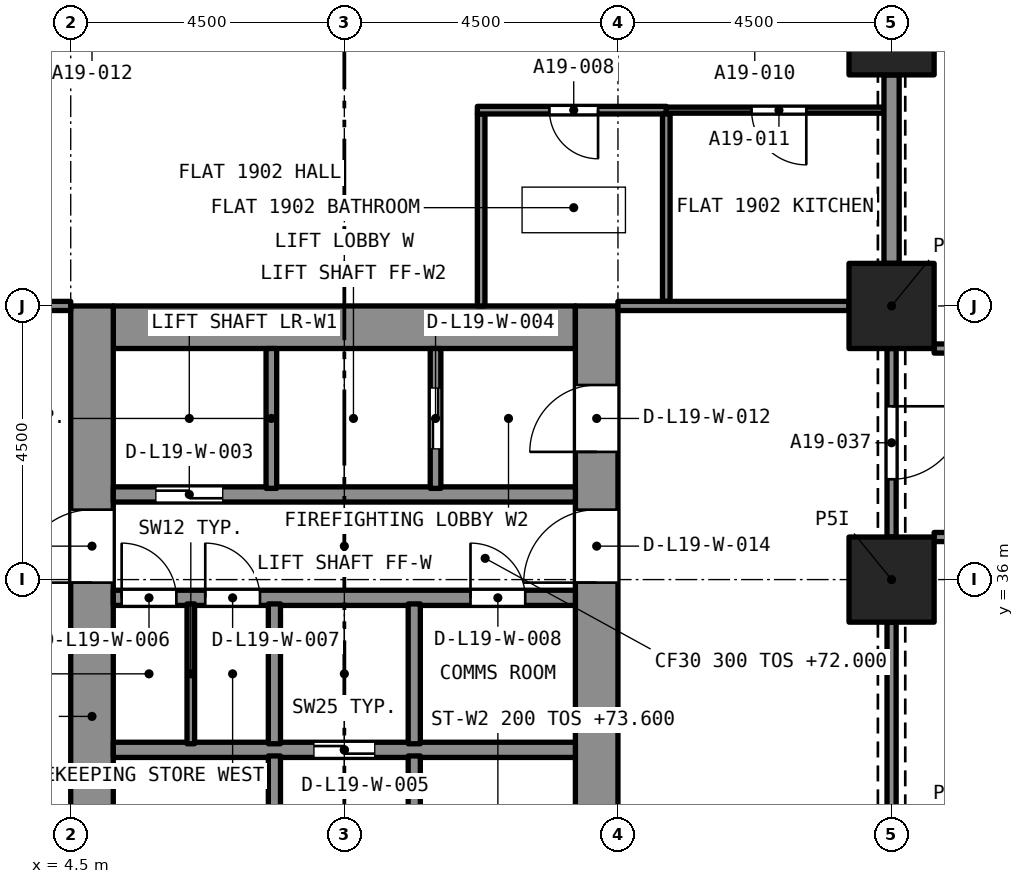
"""IFC4 building model, lengths in metres.
Left out: names, types, materials, properties, quantities, classifications, styles, units other than length and angle.
Written with IfcOpenShell. Run it as: python <this file> out.ifc"""

import sys

from ifc_helpers import new_model, si_unit, direction, frame, frame_2d, origin, origin_2d, place, context, subcontext, project, spatial, rectangle, extrude, element, fill, save


model = new_model("IFC4")
c1 = context("Model", 3, precision=1e-05, world=origin(), true_north=direction((0.0, 1.0)))
c2 = subcontext(c1, "Body", "Model", "MODEL_VIEW")
j1 = project(units=[si_unit("LENGTHUNIT", "METRE"), si_unit("PLANEANGLEUNIT", "RADIAN")], contexts=[c1])
p1 = place(None, origin())
s1 = spatial("IfcSite", under=j1, at=p1, CompositionType="ELEMENT")
p2 = place(p1, origin())
s2 = spatial("IfcBuilding", under=s1, at=p2, CompositionType="ELEMENT")
p3 = place(p2, frame((0.0, 0.0, 72.0)))
s3 = spatial("IfcBuildingStorey", under=s2, at=p3, CompositionType="ELEMENT", Elevation=72.0)
for number, where, z_axis, x_axis in (
    (1, (18.0, 36.0, 0.0), (0.0, 0.0, 1.0), (1.0, 0.0, 0.0)),
    (2, (18.0, 40.5, 0.0), (0.0, 0.0, 1.0), (1.0, 0.0, 0.0)),
    (3, (18.0, 45.0, 0.0), (0.0, 0.0, 1.0), (1.0, 0.0, 0.0)),
):
    element("IfcColumn", number, at=place(p3, frame(where, z_axis=z_axis, x_axis=x_axis)), inside=s3, PredefinedType="COLUMN", context=c2, shape_type="SweptSolid", body=[
        extrude(rectangle(XDim=1.4, YDim=1.4, at=origin_2d()), origin(), (0.0, 0.0, 1.0), 3.2),
    ])
p4 = place(p3, frame((5.2, 40.15, 0.0), z_axis=(0.0, 0.0, 1.0), x_axis=(1.0, 0.0, 0.0)))
e4 = element("IfcWall", 4, at=p4, inside=s3, PredefinedType="SOLIDWALL", context=c2, shape_type="SweptSolid", body=[
    extrude(rectangle(XDim=7.6, YDim=0.7, at=frame_2d((3.8, 0.0))), origin(), (0.0, 0.0, 1.0), 3.2),
])
p5 = place(p3, frame((4.85, 27.0, 0.0), z_axis=(0.0, 0.0, 1.0), x_axis=(0.0, 1.0, 0.0)))
e5 = element("IfcWall", 5, at=p5, inside=s3, PredefinedType="SOLIDWALL", context=c2, shape_type="SweptSolid", body=[
    extrude(rectangle(XDim=13.5, YDim=0.7, at=frame_2d((6.75, 0.0))), origin(), (0.0, 0.0, 1.0), 3.2),
])
p6 = place(p5, frame((8.95, 0.0, 0.0)))
e6 = element("IfcOpeningElement", 6, at=p6, cuts=e5, PredefinedType="OPENING", context=c2, shape_type="SweptSolid", body=[
    extrude(rectangle(XDim=1.2, YDim=2.1, at=frame_2d((0.6, 1.05))), frame((0.0, 0.36, 0.0), z_axis=(0.0, -1.0, 0.0), x_axis=(1.0, 0.0, 0.0)), (0.0, 0.0, 1.0), 0.72),
])
p7 = place(p3, frame((13.15, 27.0, 0.0), z_axis=(0.0, 0.0, 1.0), x_axis=(0.0, 1.0, 0.0)))
e7 = element("IfcWall", 7, at=p7, inside=s3, PredefinedType="SOLIDWALL", context=c2, shape_type="SweptSolid", body=[
    extrude(rectangle(XDim=13.5, YDim=0.7, at=frame_2d((6.75, 0.0))), origin(), (0.0, 0.0, 1.0), 3.2),
])
p8 = place(p7, frame((11.1, 0.0, 0.0)))
e8 = element("IfcOpeningElement", 8, at=p8, cuts=e7, PredefinedType="OPENING", context=c2, shape_type="SweptSolid", body=[
    extrude(rectangle(XDim=1.1, YDim=2.1, at=frame_2d((0.55, 1.05))), frame((0.0, 0.36, 0.0), z_axis=(0.0, -1.0, 0.0), x_axis=(1.0, 0.0, 0.0)), (0.0, 0.0, 1.0), 0.72),
])
p9 = place(p7, frame((8.95, 0.0, 0.0)))
e9 = element("IfcOpeningElement", 9, at=p9, cuts=e7, PredefinedType="OPENING", context=c2, shape_type="SweptSolid", body=[
    extrude(rectangle(XDim=1.2, YDim=2.1, at=frame_2d((0.6, 1.05))), frame((0.0, 0.36, 0.0), z_axis=(0.0, -1.0, 0.0), x_axis=(1.0, 0.0, 0.0)), (0.0, 0.0, 1.0), 0.72),
])
p10 = place(p3, frame((11.25, 40.5, 0.0), z_axis=(0.0, 0.0, 1.0), x_axis=(0.0, 1.0, 0.0)))
e10 = element("IfcWall", 10, at=p10, inside=s3, PredefinedType="PARTITIONING", context=c2, shape_type="SweptSolid", body=[
    extrude(rectangle(XDim=3.157, YDim=0.125, at=frame_2d((1.579, 0.0))), origin(), (0.0, 0.0, 1.0), 2.7),
])
p11 = place(p3, frame((14.295, 43.72, 0.0), z_axis=(0.0, 0.0, 1.0), x_axis=(-1.0, 0.0, 0.0)))
e11 = element("IfcWall", 11, at=p11, inside=s3, PredefinedType="PARTITIONING", context=c2, shape_type="SweptSolid", body=[
    extrude(rectangle(XDim=3.108, YDim=0.125, at=frame_2d((1.554, 0.0))), origin(), (0.0, 0.0, 1.0), 2.7),
])
p12 = place(p11, frame((1.123, 0.0, 0.0)))
e12 = element("IfcOpeningElement", 12, at=p12, cuts=e11, PredefinedType="OPENING", context=c2, shape_type="SweptSolid", body=[
    extrude(rectangle(XDim=0.8, YDim=2.1, at=frame_2d((0.4, 1.05))), frame((0.0, 0.073, 0.0), z_axis=(0.0, -1.0, 0.0), x_axis=(1.0, 0.0, 0.0)), (0.0, 0.0, 1.0), 0.145),
])
p13 = place(p3, frame((14.295, 40.575, 0.0), z_axis=(0.0, 0.0, 1.0), x_axis=(0.0, 1.0, 0.0)))
e13 = element("IfcWall", 13, at=p13, inside=s3, PredefinedType="PARTITIONING", context=c2, shape_type="SweptSolid", body=[
    extrude(rectangle(XDim=3.083, YDim=0.125, at=frame_2d((1.541, 0.0))), origin(), (0.0, 0.0, 1.0), 2.7),
])
p14 = place(p3, frame((13.5, 40.5, 0.0), z_axis=(0.0, 0.0, 1.0), x_axis=(1.0, 0.0, 0.0)))
e14 = element("IfcWall", 14, at=p14, inside=s3, PredefinedType="PARTITIONING", context=c2, shape_type="SweptSolid", body=[
    extrude(rectangle(XDim=3.8, YDim=0.15, at=frame_2d((1.9, 0.0))), origin(), (0.0, 0.0, 1.0), 2.7),
])
p15 = place(p3, frame((17.875, 43.72, 0.0), z_axis=(0.0, 0.0, 1.0), x_axis=(-1.0, 0.0, 0.0)))
e15 = element("IfcWall", 15, at=p15, inside=s3, PredefinedType="PARTITIONING", context=c2, shape_type="SweptSolid", body=[
    extrude(rectangle(XDim=3.58, YDim=0.1, at=frame_2d((1.79, 0.0))), origin(), (0.0, 0.0, 1.0), 2.7),
])
p16 = place(p15, frame((1.277, 0.0, 0.0)))
e16 = element("IfcOpeningElement", 16, at=p16, cuts=e15, PredefinedType="OPENING", context=c2, shape_type="SweptSolid", body=[
    extrude(rectangle(XDim=0.9, YDim=2.1, at=frame_2d((0.45, 1.05))), frame((0.0, 0.06, 0.0), z_axis=(0.0, -1.0, 0.0), x_axis=(1.0, 0.0, 0.0)), (0.0, 0.0, 1.0), 0.12),
])
p17 = place(p3, frame((0.7, 40.5, 0.0), z_axis=(0.0, 0.0, 1.0), x_axis=(1.0, 0.0, 0.0)))
e17 = element("IfcWall", 17, at=p17, inside=s3, PredefinedType="PARTITIONING", context=c2, shape_type="SweptSolid", body=[
    extrude(rectangle(XDim=3.8, YDim=0.15, at=frame_2d((1.9, 0.0))), origin(), (0.0, 0.0, 1.0), 2.7),
])
p18 = place(p17, frame((1.05, 0.0, 0.0)))
e18 = element("IfcOpeningElement", 18, at=p18, cuts=e17, PredefinedType="OPENING", context=c2, shape_type="SweptSolid", body=[
    extrude(rectangle(XDim=1.0, YDim=2.1, at=frame_2d((0.5, 1.05))), frame((0.0, 0.085, 0.0), z_axis=(0.0, -1.0, 0.0), x_axis=(1.0, 0.0, 0.0)), (0.0, 0.0, 1.0), 0.17),
])
p19 = place(p3, frame((18.0, 41.2, 0.0), z_axis=(0.0, 0.0, 1.0), x_axis=(0.0, 1.0, 0.0)))
e19 = element("IfcWall", 19, at=p19, inside=s3, PredefinedType="PARTITIONING", context=c2, shape_type="SweptSolid", body=[
    extrude(rectangle(XDim=3.1, YDim=0.25, at=frame_2d((1.55, 0.0))), origin(), (0.0, 0.0, 1.0), 2.38),
])
p20 = place(p3, frame((18.7, 39.8, 0.0), z_axis=(0.0, 0.0, 1.0), x_axis=(1.0, 0.0, 0.0)))
e20 = element("IfcWall", 20, at=p20, inside=s3, PredefinedType="PARTITIONING", context=c2, shape_type="SweptSolid", body=[
    extrude(rectangle(XDim=12.1, YDim=0.15, at=frame_2d((6.05, 0.0))), origin(), (0.0, 0.0, 1.0), 2.7),
])
p21 = place(p20, frame((5.55, 0.0, 0.0)))
e21 = element("IfcOpeningElement", 21, at=p21, cuts=e20, PredefinedType="OPENING", context=c2, shape_type="SweptSolid", body=[
    extrude(rectangle(XDim=1.0, YDim=2.1, at=frame_2d((0.5, 1.05))), frame((0.0, 0.085, 0.0), z_axis=(0.0, -1.0, 0.0), x_axis=(1.0, 0.0, 0.0)), (0.0, 0.0, 1.0), 0.17),
])
p22 = place(p3, frame((30.8, 36.7, 0.0), z_axis=(0.0, 0.0, 1.0), x_axis=(-1.0, 0.0, 0.0)))
e22 = element("IfcWall", 22, at=p22, inside=s3, PredefinedType="PARTITIONING", context=c2, shape_type="SweptSolid", body=[
    extrude(rectangle(XDim=12.1, YDim=0.15, at=frame_2d((6.05, 0.0))), origin(), (0.0, 0.0, 1.0), 2.7),
])
p23 = place(p22, frame((5.55, 0.0, 0.0)))
e23 = element("IfcOpeningElement", 23, at=p23, cuts=e22, PredefinedType="OPENING", context=c2, shape_type="SweptSolid", body=[
    extrude(rectangle(XDim=1.0, YDim=2.1, at=frame_2d((0.5, 1.05))), frame((0.0, 0.085, 0.0), z_axis=(0.0, -1.0, 0.0), x_axis=(1.0, 0.0, 0.0)), (0.0, 0.0, 1.0), 0.17),
])
p24 = place(p3, frame((18.0, 39.8, 0.0), z_axis=(0.0, 0.0, 1.0), x_axis=(0.0, -1.0, 0.0)))
e24 = element("IfcWall", 24, at=p24, inside=s3, PredefinedType="PARTITIONING", context=c2, shape_type="SweptSolid", body=[
    extrude(rectangle(XDim=3.1, YDim=0.15, at=frame_2d((1.55, 0.0))), origin(), (0.0, 0.0, 1.0), 2.38),
])
p25 = place(p24, frame((0.95, 0.0, 0.0)))
e25 = element("IfcOpeningElement", 25, at=p25, cuts=e24, PredefinedType="OPENING", context=c2, shape_type="SweptSolid", body=[
    extrude(rectangle(XDim=1.2, YDim=2.1, at=frame_2d((0.6, 1.05))), frame((0.0, 0.085, 0.0), z_axis=(0.0, -1.0, 0.0), x_axis=(1.0, 0.0, 0.0)), (0.0, 0.0, 1.0), 0.17),
])
p26 = place(p3, frame((18.0, 32.2, 0.0), z_axis=(0.0, 0.0, 1.0), x_axis=(0.0, 1.0, 0.0)))
e26 = element("IfcWall", 26, at=p26, inside=s3, PredefinedType="PARTITIONING", context=c2, shape_type="SweptSolid", body=[
    extrude(rectangle(XDim=3.1, YDim=0.15, at=frame_2d((1.55, 0.0))), origin(), (0.0, 0.0, 1.0), 2.38),
])
p27 = place(p3, frame((5.2, 33.2, 0.0), z_axis=(0.0, 0.0, 1.0), x_axis=(1.0, 0.0, 0.0)))
e27 = element("IfcWall", 27, at=p27, inside=s3, PredefinedType="SOLIDWALL", context=c2, shape_type="SweptSolid", body=[
    extrude(rectangle(XDim=7.6, YDim=0.25, at=frame_2d((3.8, 0.0))), origin(), (0.0, 0.0, 1.0), 2.7),
])
p28 = place(p27, frame((3.3, 0.0, 0.0)))
e28 = element("IfcOpeningElement", 28, at=p28, cuts=e27, PredefinedType="OPENING", context=c2, shape_type="SweptSolid", body=[
    extrude(rectangle(XDim=1.0, YDim=2.1, at=frame_2d((0.5, 1.05))), frame((0.0, 0.135, 0.0), z_axis=(0.0, -1.0, 0.0), x_axis=(1.0, 0.0, 0.0)), (0.0, 0.0, 1.0), 0.27),
])
p29 = place(p3, frame((5.2, 35.7, 0.0), z_axis=(0.0, 0.0, 1.0), x_axis=(1.0, 0.0, 0.0)))
e29 = element("IfcWall", 29, at=p29, inside=s3, PredefinedType="SOLIDWALL", context=c2, shape_type="SweptSolid", body=[
    extrude(rectangle(XDim=7.6, YDim=0.25, at=frame_2d((3.8, 0.0))), origin(), (0.0, 0.0, 1.0), 2.7),
])
p30 = place(p29, frame((0.137, 0.0, 0.0)))
e30 = element("IfcOpeningElement", 30, at=p30, cuts=e29, PredefinedType="OPENING", context=c2, shape_type="SweptSolid", body=[
    extrude(rectangle(XDim=0.9, YDim=2.1, at=frame_2d((0.45, 1.05))), frame((0.0, 0.135, 0.0), z_axis=(0.0, -1.0, 0.0), x_axis=(1.0, 0.0, 0.0)), (0.0, 0.0, 1.0), 0.27),
])
p31 = place(p29, frame((1.512, 0.0, 0.0)))
e31 = element("IfcOpeningElement", 31, at=p31, cuts=e29, PredefinedType="OPENING", context=c2, shape_type="SweptSolid", body=[
    extrude(rectangle(XDim=0.9, YDim=2.1, at=frame_2d((0.45, 1.05))), frame((0.0, 0.135, 0.0), z_axis=(0.0, -1.0, 0.0), x_axis=(1.0, 0.0, 0.0)), (0.0, 0.0, 1.0), 0.27),
])
p32 = place(p29, frame((5.875, 0.0, 0.0)))
e32 = element("IfcOpeningElement", 32, at=p32, cuts=e29, PredefinedType="OPENING", context=c2, shape_type="SweptSolid", body=[
    extrude(rectangle(XDim=0.9, YDim=2.1, at=frame_2d((0.45, 1.05))), frame((0.0, 0.135, 0.0), z_axis=(0.0, -1.0, 0.0), x_axis=(1.0, 0.0, 0.0)), (0.0, 0.0, 1.0), 0.27),
])
p33 = place(p3, frame((5.2, 37.4, 0.0), z_axis=(0.0, 0.0, 1.0), x_axis=(1.0, 0.0, 0.0)))
e33 = element("IfcWall", 33, at=p33, inside=s3, PredefinedType="SOLIDWALL", context=c2, shape_type="SweptSolid", body=[
    extrude(rectangle(XDim=7.6, YDim=0.25, at=frame_2d((3.8, 0.0))), origin(), (0.0, 0.0, 1.0), 2.7),
])
p34 = place(p33, frame((0.7, 0.0, 0.0)))
e34 = element("IfcOpeningElement", 34, at=p34, cuts=e33, PredefinedType="OPENING", context=c2, shape_type="SweptSolid", body=[
    extrude(rectangle(XDim=1.1, YDim=2.4, at=frame_2d((0.55, 1.2))), frame((0.0, 0.135, 0.0), z_axis=(0.0, -1.0, 0.0), x_axis=(1.0, 0.0, 0.0)), (0.0, 0.0, 1.0), 0.27),
])
p35 = place(p3, frame((7.85, 27.7, 0.0), z_axis=(0.0, 0.0, 1.0), x_axis=(0.0, 1.0, 0.0)))
e35 = element("IfcWall", 35, at=p35, inside=s3, PredefinedType="SOLIDWALL", context=c2, shape_type="SweptSolid", body=[
    extrude(rectangle(XDim=5.4, YDim=0.2, at=frame_2d((2.7, 0.0))), origin(), (0.0, 0.0, 1.0), 2.7),
])
p36 = place(p35, frame((0.2, 0.0, 0.0)))
e36 = element("IfcOpeningElement", 36, at=p36, cuts=e35, PredefinedType="OPENING", context=c2, shape_type="SweptSolid", body=[
    extrude(rectangle(XDim=0.9, YDim=2.1, at=frame_2d((0.45, 1.05))), frame((0.0, 0.11, 0.0), z_axis=(0.0, -1.0, 0.0), x_axis=(1.0, 0.0, 0.0)), (0.0, 0.0, 1.0), 0.22),
])
p37 = place(p3, frame((10.15, 27.7, 0.0), z_axis=(0.0, 0.0, 1.0), x_axis=(0.0, 1.0, 0.0)))
e37 = element("IfcWall", 37, at=p37, inside=s3, PredefinedType="SOLIDWALL", context=c2, shape_type="SweptSolid", body=[
    extrude(rectangle(XDim=5.4, YDim=0.2, at=frame_2d((2.7, 0.0))), origin(), (0.0, 0.0, 1.0), 2.7),
])
p38 = place(p37, frame((0.2, 0.0, 0.0)))
e38 = element("IfcOpeningElement", 38, at=p38, cuts=e37, PredefinedType="OPENING", context=c2, shape_type="SweptSolid", body=[
    extrude(rectangle(XDim=0.9, YDim=2.1, at=frame_2d((0.45, 1.05))), frame((0.0, 0.11, 0.0), z_axis=(0.0, -1.0, 0.0), x_axis=(1.0, 0.0, 0.0)), (0.0, 0.0, 1.0), 0.22),
])
for number, where, z_axis, x_axis in (
    (39, (7.85, 33.3, 0.0), (0.0, 0.0, 1.0), (0.0, 1.0, 0.0)),
    (40, (10.15, 33.3, 0.0), (0.0, 0.0, 1.0), (0.0, 1.0, 0.0)),
):
    element("IfcWall", number, at=place(p3, frame(where, z_axis=z_axis, x_axis=x_axis)), inside=s3, PredefinedType="SOLIDWALL", context=c2, shape_type="SweptSolid", body=[
        extrude(rectangle(XDim=2.3, YDim=0.2, at=frame_2d((1.15, 0.0))), origin(), (0.0, 0.0, 1.0), 2.7),
    ])
p39 = place(p3, frame((7.8, 37.5, 0.0), z_axis=(0.0, 0.0, 1.0), x_axis=(0.0, 1.0, 0.0)))
e41 = element("IfcWall", 41, at=p39, inside=s3, PredefinedType="SOLIDWALL", context=c2, shape_type="SweptSolid", body=[
    extrude(rectangle(XDim=2.3, YDim=0.175, at=frame_2d((1.15, 0.0))), origin(), (0.0, 0.0, 1.0), 2.7),
])
p40 = place(p3, frame((10.5, 37.5, 0.0), z_axis=(0.0, 0.0, 1.0), x_axis=(0.0, 1.0, 0.0)))
e42 = element("IfcWall", 42, at=p40, inside=s3, PredefinedType="SOLIDWALL", context=c2, shape_type="SweptSolid", body=[
    extrude(rectangle(XDim=2.3, YDim=0.175, at=frame_2d((1.15, 0.0))), origin(), (0.0, 0.0, 1.0), 2.7),
])
p41 = place(p40, frame((0.65, 0.0, 0.0)))
e43 = element("IfcOpeningElement", 43, at=p41, cuts=e42, PredefinedType="OPENING", context=c2, shape_type="SweptSolid", body=[
    extrude(rectangle(XDim=1.0, YDim=2.1, at=frame_2d((0.5, 1.05))), frame((0.0, 0.097, 0.0), z_axis=(0.0, -1.0, 0.0), x_axis=(1.0, 0.0, 0.0)), (0.0, 0.0, 1.0), 0.195),
])
p42 = place(p3, frame((6.475, 33.3, 0.0), z_axis=(0.0, 0.0, 1.0), x_axis=(0.0, 1.0, 0.0)))
e44 = element("IfcWall", 44, at=p42, inside=s3, PredefinedType="PARTITIONING", context=c2, shape_type="SweptSolid", body=[
    extrude(rectangle(XDim=2.3, YDim=0.125, at=frame_2d((1.15, 0.0))), origin(), (0.0, 0.0, 1.0), 2.7),
])
p43 = place(p12, origin())
e45 = element("IfcDoor", 45, at=p43, inside=s3, OperationType="SINGLE_SWING_LEFT", PredefinedType="DOOR", context=c2, shape_type="SweptSolid", body=[
    extrude(rectangle(XDim=0.8, YDim=2.1, at=frame_2d((0.4, 1.05))), frame((0.0, 0.025, 0.0), z_axis=(0.0, -1.0, 0.0), x_axis=(1.0, 0.0, 0.0)), (0.0, 0.0, 1.0), 0.05),
])
fill(e12, e45)
p44 = place(p16, origin())
e46 = element("IfcDoor", 46, at=p44, inside=s3, OperationType="SINGLE_SWING_LEFT", PredefinedType="DOOR", context=c2, shape_type="SweptSolid", body=[
    extrude(rectangle(XDim=0.9, YDim=2.1, at=frame_2d((0.45, 1.05))), frame((0.0, 0.025, 0.0), z_axis=(0.0, -1.0, 0.0), x_axis=(1.0, 0.0, 0.0)), (0.0, 0.0, 1.0), 0.05),
])
fill(e16, e46)
p45 = place(p25, origin())
e47 = element("IfcDoor", 47, at=p45, inside=s3, OperationType="SINGLE_SWING_LEFT", PredefinedType="DOOR", context=c2, shape_type="SweptSolid", body=[
    extrude(rectangle(XDim=1.2, YDim=2.1, at=frame_2d((0.6, 1.05))), frame((0.0, 0.025, 0.0), z_axis=(0.0, -1.0, 0.0), x_axis=(1.0, 0.0, 0.0)), (0.0, 0.0, 1.0), 0.05),
])
fill(e25, e47)
p46 = place(p34, origin())
e48 = element("IfcDoor", 48, at=p46, inside=s3, OperationType="SLIDING_TO_LEFT", PredefinedType="DOOR", context=c2, shape_type="SweptSolid", body=[
    extrude(rectangle(XDim=1.1, YDim=2.4, at=frame_2d((0.55, 1.2))), frame((0.0, 0.025, 0.0), z_axis=(0.0, -1.0, 0.0), x_axis=(1.0, 0.0, 0.0)), (0.0, 0.0, 1.0), 0.05),
])
fill(e34, e48)
p47 = place(p41, origin())
e49 = element("IfcDoor", 49, at=p47, inside=s3, OperationType="SLIDING_TO_LEFT", PredefinedType="DOOR", context=c2, shape_type="SweptSolid", body=[
    extrude(rectangle(XDim=1.0, YDim=2.1, at=frame_2d((0.5, 1.05))), frame((0.0, 0.025, 0.0), z_axis=(0.0, -1.0, 0.0), x_axis=(1.0, 0.0, 0.0)), (0.0, 0.0, 1.0), 0.05),
])
fill(e43, e49)
p48 = place(p28, origin())
e50 = element("IfcDoor", 50, at=p48, inside=s3, OperationType="SLIDING_TO_LEFT", PredefinedType="DOOR", context=c2, shape_type="SweptSolid", body=[
    extrude(rectangle(XDim=1.0, YDim=2.1, at=frame_2d((0.5, 1.05))), frame((0.0, 0.025, 0.0), z_axis=(0.0, -1.0, 0.0), x_axis=(1.0, 0.0, 0.0)), (0.0, 0.0, 1.0), 0.05),
])
fill(e28, e50)
p49 = place(p30, origin())
e51 = element("IfcDoor", 51, at=p49, inside=s3, OperationType="SINGLE_SWING_LEFT", PredefinedType="DOOR", context=c2, shape_type="SweptSolid", body=[
    extrude(rectangle(XDim=0.9, YDim=2.1, at=frame_2d((0.45, 1.05))), frame((0.0, 0.025, 0.0), z_axis=(0.0, -1.0, 0.0), x_axis=(1.0, 0.0, 0.0)), (0.0, 0.0, 1.0), 0.05),
])
fill(e30, e51)
p50 = place(p31, origin())
e52 = element("IfcDoor", 52, at=p50, inside=s3, OperationType="SINGLE_SWING_LEFT", PredefinedType="DOOR", context=c2, shape_type="SweptSolid", body=[
    extrude(rectangle(XDim=0.9, YDim=2.1, at=frame_2d((0.45, 1.05))), frame((0.0, 0.025, 0.0), z_axis=(0.0, -1.0, 0.0), x_axis=(1.0, 0.0, 0.0)), (0.0, 0.0, 1.0), 0.05),
])
fill(e31, e52)
p51 = place(p32, origin())
e53 = element("IfcDoor", 53, at=p51, inside=s3, OperationType="SINGLE_SWING_LEFT", PredefinedType="DOOR", context=c2, shape_type="SweptSolid", body=[
    extrude(rectangle(XDim=0.9, YDim=2.1, at=frame_2d((0.45, 1.05))), frame((0.0, 0.025, 0.0), z_axis=(0.0, -1.0, 0.0), x_axis=(1.0, 0.0, 0.0)), (0.0, 0.0, 1.0), 0.05),
])
fill(e32, e53)
p52 = place(p8, origin())
e54 = element("IfcDoor", 54, at=p52, inside=s3, OperationType="SINGLE_SWING_LEFT", PredefinedType="DOOR", context=c2, shape_type="SweptSolid", body=[
    extrude(rectangle(XDim=1.1, YDim=2.1, at=frame_2d((0.55, 1.05))), frame((0.0, 0.025, 0.0), z_axis=(0.0, -1.0, 0.0), x_axis=(1.0, 0.0, 0.0)), (0.0, 0.0, 1.0), 0.05),
])
fill(e8, e54)
p53 = place(p6, origin())
e55 = element("IfcDoor", 55, at=p53, inside=s3, OperationType="SINGLE_SWING_LEFT", PredefinedType="DOOR", context=c2, shape_type="SweptSolid", body=[
    extrude(rectangle(XDim=1.2, YDim=2.1, at=frame_2d((0.6, 1.05))), frame((0.0, 0.025, 0.0), z_axis=(0.0, -1.0, 0.0), x_axis=(1.0, 0.0, 0.0)), (0.0, 0.0, 1.0), 0.05),
])
fill(e6, e55)
p54 = place(p9, origin())
e56 = element("IfcDoor", 56, at=p54, inside=s3, OperationType="SINGLE_SWING_LEFT", PredefinedType="DOOR", context=c2, shape_type="SweptSolid", body=[
    extrude(rectangle(XDim=1.2, YDim=2.1, at=frame_2d((0.6, 1.05))), frame((0.0, 0.025, 0.0), z_axis=(0.0, -1.0, 0.0), x_axis=(1.0, 0.0, 0.0)), (0.0, 0.0, 1.0), 0.05),
])
fill(e9, e56)
save(model, sys.argv[1])
